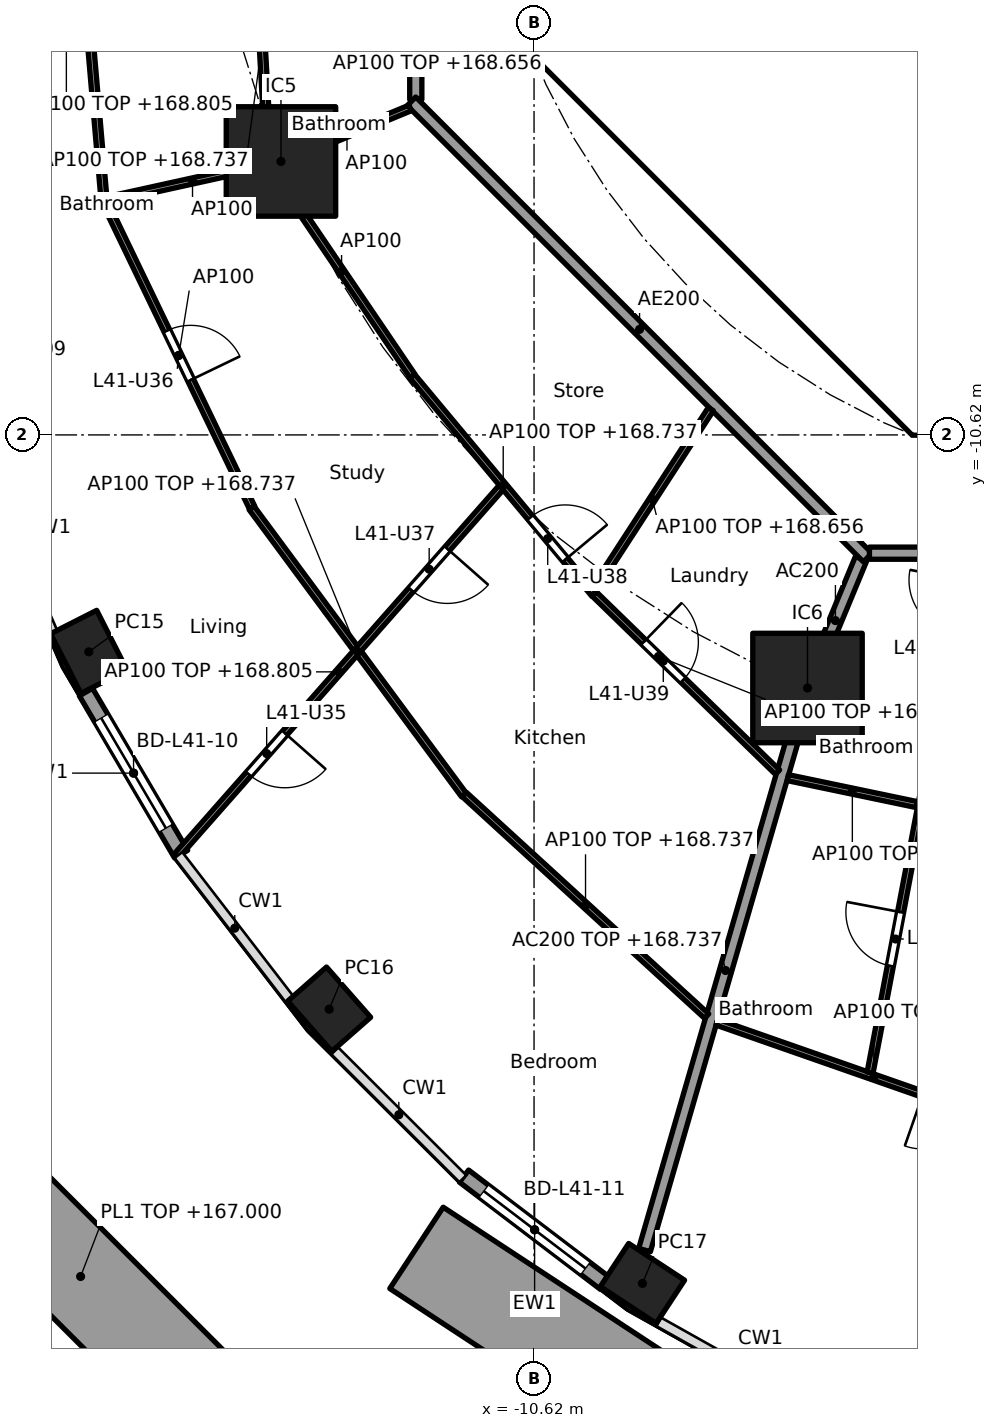
"""IFC4 building model, lengths in metres.
Left out: names, types, materials, properties, quantities, classifications, styles, units other than length and angle.
Written with IfcOpenShell. Run it as: python <this file> out.ifc"""

import sys

from ifc_helpers import new_model, si_unit, direction, frame, frame_2d, origin, origin_2d, place, context, subcontext, project, spatial, polyline, rectangle, hollow_rectangle, outline, extrude, element, fill, save


model = new_model("IFC4")
c1 = context("Model", 3, precision=1e-05, world=origin(), true_north=direction((0.0, 1.0)))
c2 = subcontext(c1, "Body", "Model", "MODEL_VIEW")
j1 = project(units=[si_unit("LENGTHUNIT", "METRE"), si_unit("PLANEANGLEUNIT", "RADIAN")], contexts=[c1])
p1 = place(None, origin())
s1 = spatial("IfcSite", under=j1, at=p1, CompositionType="ELEMENT")
p2 = place(p1, origin())
s2 = spatial("IfcBuilding", under=s1, at=p2, CompositionType="ELEMENT")
p3 = place(p2, frame((0.0, 0.0, 165.9)))
s3 = spatial("IfcBuildingStorey", under=s2, at=p3, CompositionType="ELEMENT", Elevation=165.9)
for number, where, z_axis, x_axis in (
    (1, (-17.942, -14.188, -0.26), (0.0, 0.0, 1.0), (0.452, -0.892, 0.0)),
    (2, (-13.989, -20.064, -0.26), (0.0, 0.0, 1.0), (0.66, -0.751, 0.0)),
    (3, (-8.837, -24.573, -0.26), (0.0, 0.0, 1.0), (0.836, -0.549, 0.0)),
):
    element("IfcColumn", number, at=place(p3, frame(where, z_axis=z_axis, x_axis=x_axis)), inside=s3, PredefinedType="COLUMN", context=c2, shape_type="SweptSolid", body=[
        extrude(hollow_rectangle(XDim=1.1, YDim=0.85, WallThickness=0.036, at=origin_2d()), origin(), (0.0, 0.0, 1.0), 3.96),
    ])
for number, where, z_axis, x_axis in (
    (4, (-14.782, -6.123, 0.0), (0.0, 0.0, 1.0), (1.0, 0.0, 0.0)),
    (5, (-6.123, -14.782, 0.0), (0.0, 0.0, 1.0), (1.0, 0.0, 0.0)),
):
    element("IfcColumn", number, at=place(p3, frame(where, z_axis=z_axis, x_axis=x_axis)), inside=s3, PredefinedType="COLUMN", context=c2, shape_type="SweptSolid", body=[
        extrude(rectangle(XDim=1.8, YDim=1.8, at=origin_2d()), origin(), (0.0, 0.0, 1.0), 3.7),
    ])
p4 = place(p3, frame((-16.424, -17.515, 0.0), z_axis=(0.0, 0.0, 1.0), x_axis=(-0.506309086483, 0.862352079458, 0.0)))
e6 = element("IfcWall", 6, at=p4, inside=s3, PredefinedType="SOLIDWALL", context=c2, shape_type="SweptSolid", body=[
    extrude(rectangle(XDim=3.092, YDim=0.25, at=frame_2d((1.546, 0.0))), origin(), (0.0, 0.0, 1.0), 3.44),
])
p5 = place(p4, frame((0.496, 0.0, 0.0)))
e7 = element("IfcOpeningElement", 7, at=p5, cuts=e6, PredefinedType="OPENING", context=c2, shape_type="SweptSolid", body=[
    extrude(rectangle(XDim=2.1, YDim=2.4, at=frame_2d((1.05, 1.2))), frame((0.0, 0.135, 0.0), z_axis=(0.0, -1.0, 0.0), x_axis=(1.0, 0.0, 0.0)), (0.0, 0.0, 1.0), 0.27),
])
p6 = place(p3, frame((-9.45, -24.574, 0.0), z_axis=(0.0, 0.0, 1.0), x_axis=(-0.796055733703, 0.60522332146, 0.0)))
e8 = element("IfcWall", 8, at=p6, inside=s3, PredefinedType="SOLIDWALL", context=c2, shape_type="SweptSolid", body=[
    extrude(rectangle(XDim=2.917, YDim=0.25, at=frame_2d((1.458, 0.0))), origin(), (0.0, 0.0, 1.0), 3.44),
])
p7 = place(p6, frame((0.408, 0.0, 0.0)))
e9 = element("IfcOpeningElement", 9, at=p7, cuts=e8, PredefinedType="OPENING", context=c2, shape_type="SweptSolid", body=[
    extrude(rectangle(XDim=2.1, YDim=2.4, at=frame_2d((1.05, 1.2))), frame((0.0, 0.135, 0.0), z_axis=(0.0, -1.0, 0.0), x_axis=(1.0, 0.0, 0.0)), (0.0, 0.0, 1.0), 0.27),
])
p8 = place(p3, frame((-14.486, -28.044, 0.0), z_axis=(0.0, 0.0, 1.0), x_axis=(-0.707695981418, 0.706517089591, 0.0)))
e10 = element("IfcWall", 10, at=p8, inside=s3, PredefinedType="SOLIDWALL", context=c2, shape_type="SweptSolid", body=[
    extrude(rectangle(XDim=10.147, YDim=1.6, at=frame_2d((5.074, 0.0))), origin(), (0.0, 0.0, 1.0), 1.1),
])
p9 = place(p3, frame((-12.553, -23.989, 0.0), z_axis=(0.0, 0.0, 1.0), x_axis=(0.835812595664, -0.549014849462, 0.0)))
e11 = element("IfcWall", 11, at=p9, inside=s3, PredefinedType="SOLIDWALL", context=c2, shape_type="SweptSolid", body=[
    extrude(rectangle(XDim=6.903, YDim=1.6, at=frame_2d((3.451, 0.0))), origin(), (0.0, 0.0, 1.0), 1.1),
])
p10 = place(p3, frame((-9.988, -4.613, 0.0), z_axis=(0.0, 0.0, 1.0), x_axis=(0.707106781187, -0.707106781187, 0.0)))
e12 = element("IfcWall", 12, at=p10, inside=s3, PredefinedType="SHEAR", context=c2, shape_type="SweptSolid", body=[
    extrude(rectangle(XDim=7.602, YDim=0.6, at=frame_2d((3.801, 0.0))), origin(), (0.0, 0.0, 1.0), 3.44),
])
p11 = place(p10, frame((6.151, 0.0, 0.0)))
e13 = element("IfcOpeningElement", 13, at=p11, cuts=e12, PredefinedType="OPENING", context=c2, shape_type="SweptSolid", body=[
    extrude(rectangle(XDim=1.1, YDim=2.1, at=frame_2d((0.55, 1.05))), frame((0.0, 0.31, 0.0), z_axis=(0.0, -1.0, 0.0), x_axis=(1.0, 0.0, 0.0)), (0.0, 0.0, 1.0), 0.62),
])
p12 = place(p3, frame((-5.8, -8.227, 0.0), z_axis=(0.0, 0.0, 1.0), x_axis=(0.0, 1.0, 0.0)))
e14 = element("IfcWall", 14, at=p12, inside=s3, PredefinedType="PARTITIONING", context=c2, shape_type="SweptSolid", body=[
    extrude(rectangle(XDim=3.927, YDim=0.15, at=frame_2d((1.963, 0.0))), origin(), (0.0, 0.0, 1.0), 3.44),
])
p13 = place(p12, frame((2.764, 0.0, 0.0)))
e15 = element("IfcOpeningElement", 15, at=p13, cuts=e14, PredefinedType="OPENING", context=c2, shape_type="SweptSolid", body=[
    extrude(rectangle(XDim=0.9, YDim=2.1, at=frame_2d((0.45, 1.05))), frame((0.0, 0.085, 0.0), z_axis=(0.0, -1.0, 0.0), x_axis=(1.0, 0.0, 0.0)), (0.0, 0.0, 1.0), 0.17),
])
p14 = place(p12, frame((0.688, 0.0, 0.0)))
e16 = element("IfcOpeningElement", 16, at=p14, cuts=e14, PredefinedType="OPENING", context=c2, shape_type="SweptSolid", body=[
    extrude(rectangle(XDim=0.9, YDim=2.1, at=frame_2d((0.45, 1.05))), frame((0.0, 0.085, 0.0), z_axis=(0.0, -1.0, 0.0), x_axis=(1.0, 0.0, 0.0)), (0.0, 0.0, 1.0), 0.17),
])
p15 = place(p3, origin())
e17 = element("IfcWall", 17, at=p15, inside=s3, PredefinedType="SHEAR", context=c2, shape_type="SweptSolid", body=[
    extrude(outline(polyline([(-10.625, -3.801), (-10.025, -3.801), (-10.025, -4.152), (-9.776, -4.401), (-10.2, -4.825), (-10.625, -4.401), (-10.625, -3.801)])), origin(), (0.0, 0.0, 1.0), 3.44),
])
p16 = place(p3, origin())
e18 = element("IfcWall", 18, at=p16, inside=s3, PredefinedType="SHEAR", context=c2, shape_type="SweptSolid", body=[
    extrude(outline(polyline([(-4.152, -10.025), (4.152, -10.025), (4.401, -9.776), (4.825, -10.2), (4.401, -10.625), (-4.401, -10.625), (-4.825, -10.2), (-4.401, -9.776), (-4.152, -10.025)])), origin(), (0.0, 0.0, 1.0), 3.44),
])
p17 = place(p3, frame((-8.301, -5.8, 0.0), z_axis=(0.0, 0.0, 1.0), x_axis=(1.0, 0.0, 0.0)))
e19 = element("IfcWall", 19, at=p17, inside=s3, PredefinedType="PARTITIONING", context=c2, shape_type="SweptSolid", body=[
    extrude(rectangle(XDim=2.426, YDim=0.15, at=frame_2d((1.213, 0.0))), origin(), (0.0, 0.0, 1.0), 3.44),
])
p18 = place(p3, frame((-5.243, -12.657, 0.0), z_axis=(0.0, 0.0, 1.0), x_axis=(-0.382707856524, -0.923869415315, 0.0)))
e20 = element("IfcWall", 20, at=p18, inside=s3, PredefinedType="PARTITIONING", context=c2, shape_type="SweptSolid", body=[
    extrude(rectangle(XDim=2.2, YDim=0.2, at=frame_2d((1.1, 0.0))), origin(), (0.0, 0.0, 1.0), 3.44),
])
p19 = place(p3, frame((-6.137, -14.83, 0.0), z_axis=(0.0, 0.0, 1.0), x_axis=(-0.278461169897, -0.96044748782, 0.0)))
e21 = element("IfcWall", 21, at=p19, inside=s3, PredefinedType="PARTITIONING", context=c2, shape_type="SweptSolid", body=[
    extrude(rectangle(XDim=9.573, YDim=0.2, at=frame_2d((4.787, 0.0))), origin(), (0.0, 0.0, 1.0), 2.837),
])
p20 = place(p3, frame((-12.565, 5.304, 0.0), z_axis=(0.0, 0.0, 1.0), x_axis=(0.0, -1.0, 0.0)))
e22 = element("IfcWall", 22, at=p20, inside=s3, PredefinedType="PARTITIONING", context=c2, shape_type="SweptSolid", body=[
    extrude(rectangle(XDim=10.409, YDim=0.2, at=frame_2d((5.205, 0.0))), origin(), (0.0, 0.0, 1.0), 3.44),
])
p21 = place(p20, frame((6.106, 0.0, 0.0)))
e23 = element("IfcOpeningElement", 23, at=p21, cuts=e22, PredefinedType="OPENING", context=c2, shape_type="SweptSolid", body=[
    extrude(rectangle(XDim=1.0, YDim=2.1, at=frame_2d((0.5, 1.05))), frame((0.0, 0.11, 0.0), z_axis=(0.0, -1.0, 0.0), x_axis=(1.0, 0.0, 0.0)), (0.0, 0.0, 1.0), 0.22),
])
p22 = place(p3, frame((-12.635, -5.134, 0.0), z_axis=(0.0, 0.0, 1.0), x_axis=(0.707106781187, -0.707106781187, 0.0)))
e24 = element("IfcWall", 24, at=p22, inside=s3, PredefinedType="PARTITIONING", context=c2, shape_type="SweptSolid", body=[
    extrude(rectangle(XDim=10.609, YDim=0.2, at=frame_2d((5.305, 0.0))), origin(), (0.0, 0.0, 1.0), 3.44),
])
p23 = place(p3, frame((-5.104, -12.565, 0.0), z_axis=(0.0, 0.0, 1.0), x_axis=(1.0, 0.0, 0.0)))
e25 = element("IfcWall", 25, at=p23, inside=s3, PredefinedType="PARTITIONING", context=c2, shape_type="SweptSolid", body=[
    extrude(rectangle(XDim=10.409, YDim=0.2, at=frame_2d((5.205, 0.0))), origin(), (0.0, 0.0, 1.0), 3.44),
])
p24 = place(p23, frame((2.87, 0.0, 0.0)))
e26 = element("IfcOpeningElement", 26, at=p24, cuts=e25, PredefinedType="OPENING", context=c2, shape_type="SweptSolid", body=[
    extrude(rectangle(XDim=1.0, YDim=2.1, at=frame_2d((0.5, 1.05))), frame((0.0, 0.11, 0.0), z_axis=(0.0, -1.0, 0.0), x_axis=(1.0, 0.0, 0.0)), (0.0, 0.0, 1.0), 0.22),
])
p25 = place(p3, frame((-18.271, -0.05, 0.0), z_axis=(0.0, 0.0, 1.0), x_axis=(0.086018199227, -0.996293565874, 0.0)))
e27 = element("IfcWall", 27, at=p25, inside=s3, PredefinedType="PARTITIONING", context=c2, shape_type="SweptSolid", body=[
    extrude(rectangle(XDim=6.789, YDim=0.1, at=frame_2d((3.395, 0.0))), origin(), (0.0, 0.0, 1.0), 2.837),
])
p26 = place(p3, frame((-15.151, -3.133, 0.0), z_axis=(0.0, 0.0, 1.0), x_axis=(0.05637501378, -0.998409664327, 0.0)))
e28 = element("IfcWall", 28, at=p26, inside=s3, PredefinedType="PARTITIONING", context=c2, shape_type="SweptSolid", body=[
    extrude(rectangle(XDim=2.988, YDim=0.1, at=frame_2d((1.494, 0.0))), origin(), (0.0, 0.0, 1.0), 2.837),
])
p27 = place(p3, frame((-12.657, -5.243, 0.0), z_axis=(0.0, 0.0, 1.0), x_axis=(-0.923848837015, -0.382757529444, 0.0)))
e29 = element("IfcWall", 29, at=p27, inside=s3, PredefinedType="PARTITIONING", context=c2, shape_type="SweptSolid", body=[
    extrude(rectangle(XDim=2.25, YDim=0.1, at=frame_2d((1.125, 0.0))), origin(), (0.0, 0.0, 1.0), 3.44),
])
p28 = place(p3, frame((-14.831, -6.134, 0.0), z_axis=(0.0, 0.0, 1.0), x_axis=(-0.976560749847, -0.215241961191, 0.0)))
e30 = element("IfcWall", 30, at=p28, inside=s3, PredefinedType="PARTITIONING", context=c2, shape_type="SweptSolid", body=[
    extrude(rectangle(XDim=2.879, YDim=0.1, at=frame_2d((1.439, 0.0))), origin(), (0.0, 0.0, 1.0), 3.44),
])
p29 = place(p3, frame((-14.952, -6.208, 0.0), z_axis=(0.0, 0.0, 1.0), x_axis=(0.561064907171, -0.827771810308, 0.0)))
e31 = element("IfcWall", 31, at=p29, inside=s3, PredefinedType="PARTITIONING", context=c2, shape_type="SweptSolid", body=[
    extrude(rectangle(XDim=4.159, YDim=0.1, at=frame_2d((2.079, 0.0))), origin(), (0.0, 0.0, 1.0), 3.44),
])
p30 = place(p3, frame((-17.669, -6.809, 0.0), z_axis=(0.0, 0.0, 1.0), x_axis=(0.434040130629, -0.900893536997, 0.0)))
e32 = element("IfcWall", 32, at=p30, inside=s3, PredefinedType="PARTITIONING", context=c2, shape_type="SweptSolid", body=[
    extrude(rectangle(XDim=5.558, YDim=0.1, at=frame_2d((2.779, 0.0))), origin(), (0.0, 0.0, 1.0), 3.44),
])
p31 = place(p30, frame((2.329, 0.0, 0.0)))
e33 = element("IfcOpeningElement", 33, at=p31, cuts=e32, PredefinedType="OPENING", context=c2, shape_type="SweptSolid", body=[
    extrude(rectangle(XDim=0.9, YDim=2.1, at=frame_2d((0.45, 1.05))), frame((0.0, 0.06, 0.0), z_axis=(0.0, -1.0, 0.0), x_axis=(1.0, 0.0, 0.0)), (0.0, 0.0, 1.0), 0.12),
])
p32 = place(p3, frame((-12.623, -9.653, 0.0), z_axis=(0.0, 0.0, 1.0), x_axis=(0.640297481347, -0.768127030758, 0.0)))
e34 = element("IfcWall", 34, at=p32, inside=s3, PredefinedType="PARTITIONING", context=c2, shape_type="SweptSolid", body=[
    extrude(rectangle(XDim=4.672, YDim=0.1, at=frame_2d((2.336, 0.0))), origin(), (0.0, 0.0, 1.0), 2.837),
])
p33 = place(p32, frame((3.029, 0.0, 0.0)))
e35 = element("IfcOpeningElement", 35, at=p33, cuts=e34, PredefinedType="OPENING", context=c2, shape_type="SweptSolid", body=[
    extrude(rectangle(XDim=0.9, YDim=2.1, at=frame_2d((0.45, 1.05))), frame((0.0, 0.06, 0.0), z_axis=(0.0, -1.0, 0.0), x_axis=(1.0, 0.0, 0.0)), (0.0, 0.0, 1.0), 0.12),
])
p34 = place(p3, frame((-15.265, -11.821, 0.0), z_axis=(0.0, 0.0, 1.0), x_axis=(0.594711348772, -0.803939308432, 0.0)))
e36 = element("IfcWall", 36, at=p34, inside=s3, PredefinedType="PARTITIONING", context=c2, shape_type="SweptSolid", body=[
    extrude(rectangle(XDim=5.872, YDim=0.1, at=frame_2d((2.936, 0.0))), origin(), (0.0, 0.0, 1.0), 2.837),
])
p35 = place(p3, frame((-11.16, -11.485, 0.0), z_axis=(0.0, 0.0, 1.0), x_axis=(-0.661275898802, -0.750142776852, 0.0)))
e37 = element("IfcWall", 37, at=p35, inside=s3, PredefinedType="PARTITIONING", context=c2, shape_type="SweptSolid", body=[
    extrude(rectangle(XDim=8.083, YDim=0.1, at=frame_2d((4.041, 0.0))), origin(), (0.0, 0.0, 1.0), 2.905),
])
p36 = place(p35, frame((5.382, 0.0, 0.0)))
e38 = element("IfcOpeningElement", 38, at=p36, cuts=e37, PredefinedType="OPENING", context=c2, shape_type="SweptSolid", body=[
    extrude(rectangle(XDim=0.9, YDim=2.1, at=frame_2d((0.45, 1.05))), frame((0.0, 0.06, 0.0), z_axis=(0.0, -1.0, 0.0), x_axis=(1.0, 0.0, 0.0)), (0.0, 0.0, 1.0), 0.12),
])
p37 = place(p35, frame((1.341, 0.0, 0.0)))
e39 = element("IfcOpeningElement", 39, at=p37, cuts=e37, PredefinedType="OPENING", context=c2, shape_type="SweptSolid", body=[
    extrude(rectangle(XDim=0.9, YDim=2.1, at=frame_2d((0.45, 1.05))), frame((0.0, 0.06, 0.0), z_axis=(0.0, -1.0, 0.0), x_axis=(1.0, 0.0, 0.0)), (0.0, 0.0, 1.0), 0.12),
])
p38 = place(p3, frame((-7.712, -10.195, 0.0), z_axis=(0.0, 0.0, 1.0), x_axis=(-0.544170086001, -0.838974920663, 0.0)))
e40 = element("IfcWall", 40, at=p38, inside=s3, PredefinedType="PARTITIONING", context=c2, shape_type="SweptSolid", body=[
    extrude(rectangle(XDim=3.535, YDim=0.1, at=frame_2d((1.768, 0.0))), origin(), (0.0, 0.0, 1.0), 2.756),
])
p39 = place(p3, frame((-9.627, -13.238, 0.0), z_axis=(0.0, 0.0, 1.0), x_axis=(0.716919058692, -0.697156412352, 0.0)))
e41 = element("IfcWall", 41, at=p39, inside=s3, PredefinedType="PARTITIONING", context=c2, shape_type="SweptSolid", body=[
    extrude(rectangle(XDim=4.2, YDim=0.1, at=frame_2d((2.1, 0.0))), origin(), (0.0, 0.0, 1.0), 2.837),
])
p40 = place(p39, frame((1.13, 0.0, 0.0)))
e42 = element("IfcOpeningElement", 42, at=p40, cuts=e41, PredefinedType="OPENING", context=c2, shape_type="SweptSolid", body=[
    extrude(rectangle(XDim=0.9, YDim=2.1, at=frame_2d((0.45, 1.05))), frame((0.0, 0.06, 0.0), z_axis=(0.0, -1.0, 0.0), x_axis=(1.0, 0.0, 0.0)), (0.0, 0.0, 1.0), 0.12),
])
p41 = place(p3, frame((-11.766, -16.535, 0.0), z_axis=(0.0, 0.0, 1.0), x_axis=(0.73807320557, -0.674720640872, 0.0)))
e43 = element("IfcWall", 43, at=p41, inside=s3, PredefinedType="PARTITIONING", context=c2, shape_type="SweptSolid", body=[
    extrude(rectangle(XDim=5.399, YDim=0.1, at=frame_2d((2.699, 0.0))), origin(), (0.0, 0.0, 1.0), 2.837),
])
p42 = place(p3, frame((-6.447, -16.256, 0.0), z_axis=(0.0, 0.0, 1.0), x_axis=(0.978909151576, -0.204296042448, 0.0)))
e44 = element("IfcWall", 44, at=p42, inside=s3, PredefinedType="PARTITIONING", context=c2, shape_type="SweptSolid", body=[
    extrude(rectangle(XDim=2.168, YDim=0.1, at=frame_2d((1.084, 0.0))), origin(), (0.0, 0.0, 1.0), 2.837),
])
p43 = place(p3, frame((-7.613, -20.278, 0.0), z_axis=(0.0, 0.0, 1.0), x_axis=(0.943918212431, -0.330179357684, 0.0)))
e45 = element("IfcWall", 45, at=p43, inside=s3, PredefinedType="PARTITIONING", context=c2, shape_type="SweptSolid", body=[
    extrude(rectangle(XDim=5.467, YDim=0.1, at=frame_2d((2.734, 0.0))), origin(), (0.0, 0.0, 1.0), 2.837),
])
p44 = place(p43, frame((3.588, 0.0, 0.0)))
e46 = element("IfcOpeningElement", 46, at=p44, cuts=e45, PredefinedType="OPENING", context=c2, shape_type="SweptSolid", body=[
    extrude(rectangle(XDim=0.9, YDim=2.1, at=frame_2d((0.45, 1.05))), frame((0.0, 0.06, 0.0), z_axis=(0.0, -1.0, 0.0), x_axis=(1.0, 0.0, 0.0)), (0.0, 0.0, 1.0), 0.12),
])
p45 = place(p3, frame((-3.488, -12.663, 0.0), z_axis=(0.0, 0.0, 1.0), x_axis=(-0.186783185485, -0.982401161247, 0.0)))
e47 = element("IfcWall", 47, at=p45, inside=s3, PredefinedType="PARTITIONING", context=c2, shape_type="SweptSolid", body=[
    extrude(rectangle(XDim=8.595, YDim=0.1, at=frame_2d((4.298, 0.0))), origin(), (0.0, 0.0, 1.0), 2.756),
])
p46 = place(p45, frame((0.35, 0.0, 0.0)))
e48 = element("IfcOpeningElement", 48, at=p46, cuts=e47, PredefinedType="OPENING", context=c2, shape_type="SweptSolid", body=[
    extrude(rectangle(XDim=0.9, YDim=2.1, at=frame_2d((0.45, 1.05))), frame((0.0, 0.06, 0.0), z_axis=(0.0, -1.0, 0.0), x_axis=(1.0, 0.0, 0.0)), (0.0, 0.0, 1.0), 0.12),
])
p47 = place(p45, frame((5.908, 0.0, 0.0)))
e49 = element("IfcOpeningElement", 49, at=p47, cuts=e47, PredefinedType="OPENING", context=c2, shape_type="SweptSolid", body=[
    extrude(rectangle(XDim=0.9, YDim=2.1, at=frame_2d((0.45, 1.05))), frame((0.0, 0.06, 0.0), z_axis=(0.0, -1.0, 0.0), x_axis=(1.0, 0.0, 0.0)), (0.0, 0.0, 1.0), 0.12),
])
p48 = place(p5, origin())
e50 = element("IfcDoor", 50, at=p48, inside=s3, OperationType="SLIDING_TO_LEFT", PredefinedType="DOOR", context=c2, shape_type="SweptSolid", body=[
    extrude(rectangle(XDim=2.1, YDim=2.4, at=frame_2d((1.05, 1.2))), frame((0.0, 0.025, 0.0), z_axis=(0.0, -1.0, 0.0), x_axis=(1.0, 0.0, 0.0)), (0.0, 0.0, 1.0), 0.05),
])
fill(e7, e50)
p49 = place(p7, origin())
e51 = element("IfcDoor", 51, at=p49, inside=s3, OperationType="SLIDING_TO_LEFT", PredefinedType="DOOR", context=c2, shape_type="SweptSolid", body=[
    extrude(rectangle(XDim=2.1, YDim=2.4, at=frame_2d((1.05, 1.2))), frame((0.0, 0.025, 0.0), z_axis=(0.0, -1.0, 0.0), x_axis=(1.0, 0.0, 0.0)), (0.0, 0.0, 1.0), 0.05),
])
fill(e9, e51)
p50 = place(p13, origin())
e52 = element("IfcDoor", 52, at=p50, inside=s3, OperationType="SINGLE_SWING_RIGHT", PredefinedType="DOOR", context=c2, shape_type="SweptSolid", body=[
    extrude(rectangle(XDim=0.9, YDim=2.1, at=frame_2d((0.45, 1.05))), frame((0.0, 0.025, 0.0), z_axis=(0.0, -1.0, 0.0), x_axis=(1.0, 0.0, 0.0)), (0.0, 0.0, 1.0), 0.05),
])
fill(e15, e52)
p51 = place(p14, origin())
e53 = element("IfcDoor", 53, at=p51, inside=s3, OperationType="SINGLE_SWING_RIGHT", PredefinedType="DOOR", context=c2, shape_type="SweptSolid", body=[
    extrude(rectangle(XDim=0.9, YDim=2.1, at=frame_2d((0.45, 1.05))), frame((0.0, 0.025, 0.0), z_axis=(0.0, -1.0, 0.0), x_axis=(1.0, 0.0, 0.0)), (0.0, 0.0, 1.0), 0.05),
])
fill(e16, e53)
p52 = place(p11, origin())
e54 = element("IfcDoor", 54, at=p52, inside=s3, OperationType="SINGLE_SWING_LEFT", PredefinedType="DOOR", context=c2, shape_type="SweptSolid", body=[
    extrude(rectangle(XDim=1.1, YDim=2.1, at=frame_2d((0.55, 1.05))), frame((0.0, 0.025, 0.0), z_axis=(0.0, -1.0, 0.0), x_axis=(1.0, 0.0, 0.0)), (0.0, 0.0, 1.0), 0.05),
])
fill(e13, e54)
p53 = place(p36, origin())
e55 = element("IfcDoor", 55, at=p53, inside=s3, OperationType="SINGLE_SWING_LEFT", PredefinedType="DOOR", context=c2, shape_type="SweptSolid", body=[
    extrude(rectangle(XDim=0.9, YDim=2.1, at=frame_2d((0.45, 1.05))), frame((0.0, 0.025, 0.0), z_axis=(0.0, -1.0, 0.0), x_axis=(1.0, 0.0, 0.0)), (0.0, 0.0, 1.0), 0.05),
])
fill(e38, e55)
p54 = place(p31, origin())
e56 = element("IfcDoor", 56, at=p54, inside=s3, OperationType="SINGLE_SWING_RIGHT", PredefinedType="DOOR", context=c2, shape_type="SweptSolid", body=[
    extrude(rectangle(XDim=0.9, YDim=2.1, at=frame_2d((0.45, 1.05))), frame((0.0, 0.025, 0.0), z_axis=(0.0, -1.0, 0.0), x_axis=(1.0, 0.0, 0.0)), (0.0, 0.0, 1.0), 0.05),
])
fill(e33, e56)
p55 = place(p37, origin())
e57 = element("IfcDoor", 57, at=p55, inside=s3, OperationType="SINGLE_SWING_LEFT", PredefinedType="DOOR", context=c2, shape_type="SweptSolid", body=[
    extrude(rectangle(XDim=0.9, YDim=2.1, at=frame_2d((0.45, 1.05))), frame((0.0, 0.025, 0.0), z_axis=(0.0, -1.0, 0.0), x_axis=(1.0, 0.0, 0.0)), (0.0, 0.0, 1.0), 0.05),
])
fill(e39, e57)
p56 = place(p33, origin())
e58 = element("IfcDoor", 58, at=p56, inside=s3, OperationType="SINGLE_SWING_RIGHT", PredefinedType="DOOR", context=c2, shape_type="SweptSolid", body=[
    extrude(rectangle(XDim=0.9, YDim=2.1, at=frame_2d((0.45, 1.05))), frame((0.0, 0.025, 0.0), z_axis=(0.0, -1.0, 0.0), x_axis=(1.0, 0.0, 0.0)), (0.0, 0.0, 1.0), 0.05),
])
fill(e35, e58)
p57 = place(p40, origin())
e59 = element("IfcDoor", 59, at=p57, inside=s3, OperationType="SINGLE_SWING_LEFT", PredefinedType="DOOR", context=c2, shape_type="SweptSolid", body=[
    extrude(rectangle(XDim=0.9, YDim=2.1, at=frame_2d((0.45, 1.05))), frame((0.0, 0.025, 0.0), z_axis=(0.0, -1.0, 0.0), x_axis=(1.0, 0.0, 0.0)), (0.0, 0.0, 1.0), 0.05),
])
fill(e42, e59)
p58 = place(p47, frame((0.9, 0.0, 0.0), x_axis=(-1.0, 0.0, 0.0)))
e60 = element("IfcDoor", 60, at=p58, inside=s3, OperationType="SINGLE_SWING_RIGHT", PredefinedType="DOOR", context=c2, shape_type="SweptSolid", body=[
    extrude(rectangle(XDim=0.9, YDim=2.1, at=frame_2d((0.45, 1.05))), frame((0.0, 0.025, 0.0), z_axis=(0.0, -1.0, 0.0), x_axis=(1.0, 0.0, 0.0)), (0.0, 0.0, 1.0), 0.05),
])
fill(e49, e60)
save(model, sys.argv[1])
